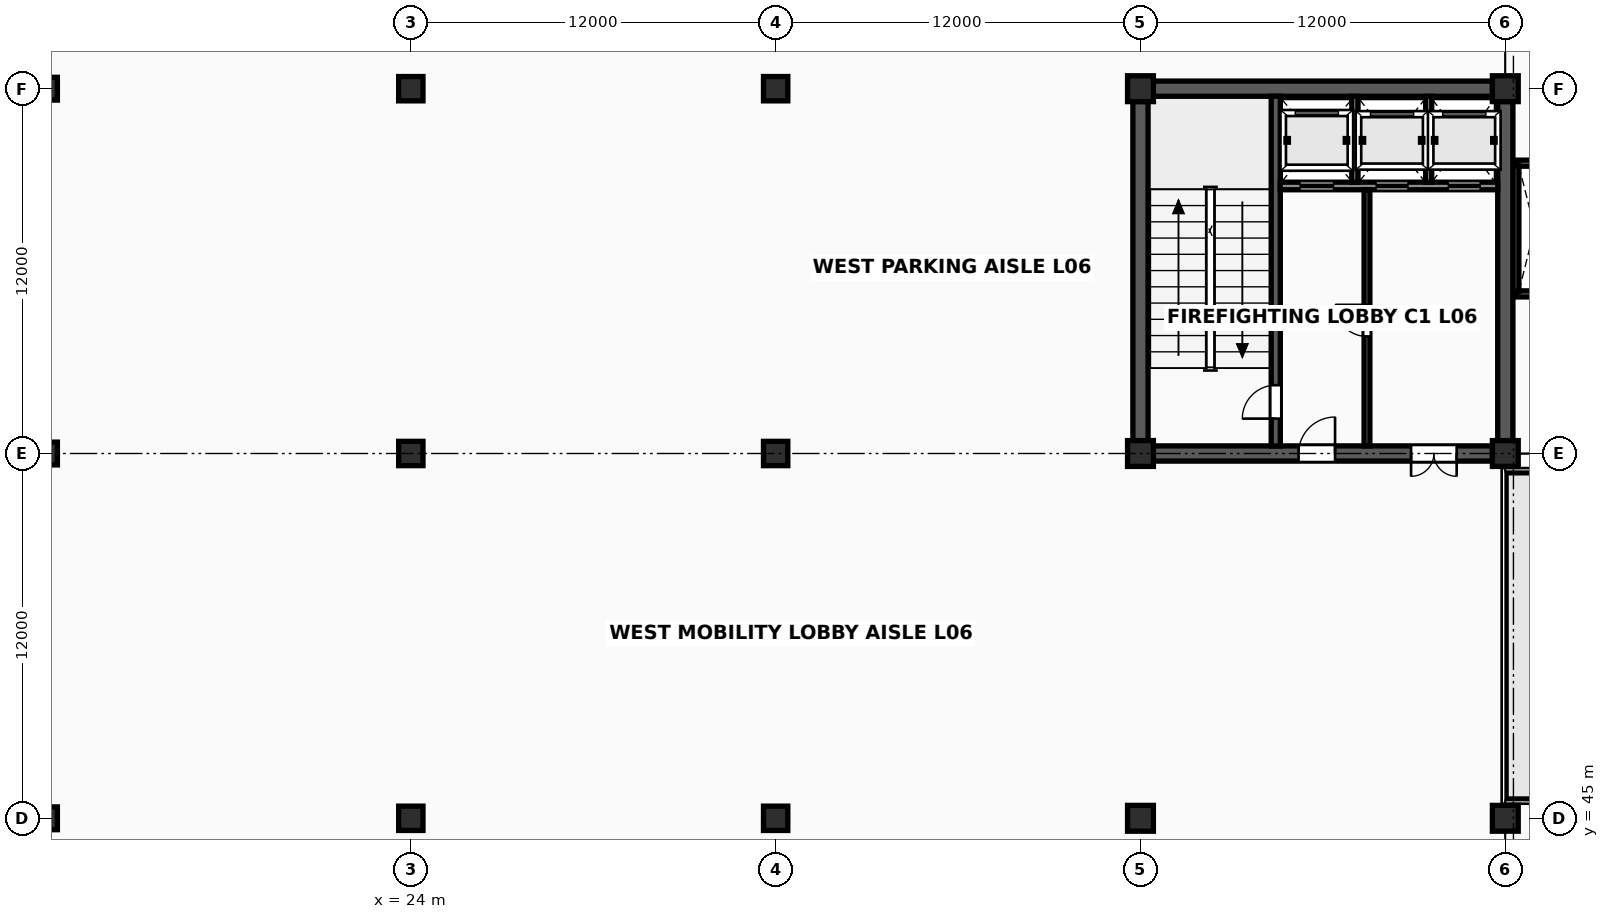
"""IFC4 building model, lengths in metres.
Left out: names, types, materials, properties, quantities, classifications, styles, units other than length and angle.
Written with IfcOpenShell. Run it as: python <this file> out.ifc"""

import sys

from ifc_helpers import new_model, si_unit, direction, frame, frame_2d, origin, origin_2d, place, context, subcontext, project, spatial, rectangle, extrude, element, fill, save


model = new_model("IFC4")
c1 = context("Model", 3, precision=1e-05, world=origin(), true_north=direction((0.0, 1.0)))
c2 = subcontext(c1, "Body", "Model", "MODEL_VIEW")
j1 = project(units=[si_unit("LENGTHUNIT", "METRE"), si_unit("PLANEANGLEUNIT", "RADIAN")], contexts=[c1])
p1 = place(None, origin())
s1 = spatial("IfcSite", under=j1, at=p1, CompositionType="ELEMENT")
p2 = place(p1, origin())
s2 = spatial("IfcBuilding", under=s1, at=p2, CompositionType="ELEMENT")
p3 = place(p2, frame((0.0, 0.0, 24.8)))
s3 = spatial("IfcBuildingStorey", under=s2, at=p3, CompositionType="ELEMENT", Elevation=24.8)
for number, where, z_axis, x_axis in (
    (1, (12.0, 45.0, 0.0), (0.0, 0.0, 1.0), (1.0, 0.0, 0.0)),
    (2, (12.0, 57.0, 0.0), (0.0, 0.0, 1.0), (1.0, 0.0, 0.0)),
    (3, (12.0, 69.0, 0.0), (0.0, 0.0, 1.0), (1.0, 0.0, 0.0)),
):
    element("IfcColumn", number, at=place(p3, frame(where, z_axis=z_axis, x_axis=x_axis)), inside=s3, PredefinedType="COLUMN", context=c2, shape_type="SweptSolid", body=[
        extrude(rectangle(XDim=0.75, YDim=0.75, at=origin_2d()), origin(), (0.0, 0.0, 1.0), 3.8),
    ])
for number, where, z_axis, x_axis in (
    (4, (24.0, 45.0, 0.0), (0.0, 0.0, 1.0), (1.0, 0.0, 0.0)),
    (5, (24.0, 57.0, 0.0), (0.0, 0.0, 1.0), (1.0, 0.0, 0.0)),
    (6, (24.0, 69.0, 0.0), (0.0, 0.0, 1.0), (1.0, 0.0, 0.0)),
    (7, (36.0, 45.0, 0.0), (0.0, 0.0, 1.0), (1.0, 0.0, 0.0)),
    (8, (36.0, 57.0, 0.0), (0.0, 0.0, 1.0), (1.0, 0.0, 0.0)),
    (9, (36.0, 69.0, 0.0), (0.0, 0.0, 1.0), (1.0, 0.0, 0.0)),
):
    element("IfcColumn", number, at=place(p3, frame(where, z_axis=z_axis, x_axis=x_axis)), inside=s3, PredefinedType="COLUMN", context=c2, shape_type="SweptSolid", body=[
        extrude(rectangle(XDim=0.8, YDim=0.8, at=origin_2d()), origin(), (0.0, 0.0, 1.0), 3.8),
    ])
for number, where, z_axis, x_axis in (
    (10, (48.0, 45.0, 0.0), (0.0, 0.0, 1.0), (1.0, 0.0, 0.0)),
    (11, (48.0, 57.0, 0.0), (0.0, 0.0, 1.0), (1.0, 0.0, 0.0)),
    (12, (48.0, 69.0, 0.0), (0.0, 0.0, 1.0), (1.0, 0.0, 0.0)),
    (13, (60.0, 45.0, 0.0), (0.0, 0.0, 1.0), (1.0, 0.0, 0.0)),
    (14, (60.0, 57.0, 0.0), (0.0, 0.0, 1.0), (1.0, 0.0, 0.0)),
    (15, (60.0, 69.0, 0.0), (0.0, 0.0, 1.0), (1.0, 0.0, 0.0)),
):
    element("IfcColumn", number, at=place(p3, frame(where, z_axis=z_axis, x_axis=x_axis)), inside=s3, PredefinedType="COLUMN", context=c2, shape_type="SweptSolid", body=[
        extrude(rectangle(XDim=0.85, YDim=0.85, at=origin_2d()), origin(), (0.0, 0.0, 1.0), 3.8),
    ])
for number, where, z_axis, x_axis in (
    (16, (60.347, 62.25, 0.0), (0.0, 0.0, 1.0), (1.0, 0.0, 0.0)),
    (17, (60.347, 66.55, 0.0), (0.0, 0.0, 1.0), (1.0, 0.0, 0.0)),
):
    element("IfcWall", number, at=place(p3, frame(where, z_axis=z_axis, x_axis=x_axis)), inside=s3, PredefinedType="SOLIDWALL", context=c2, shape_type="SweptSolid", body=[
        extrude(rectangle(XDim=1.233, YDim=0.2, at=frame_2d((0.617, 0.0))), origin(), (0.0, 0.0, 1.0), 3.628),
    ])
p4 = place(p3, frame((60.347, 62.33, 0.0), z_axis=(0.0, 0.0, 1.0), x_axis=(0.0, 1.0, 0.0)))
e18 = element("IfcWall", 18, at=p4, inside=s3, PredefinedType="SOLIDWALL", context=c2, shape_type="SweptSolid", body=[
    extrude(rectangle(XDim=4.14, YDim=0.2, at=frame_2d((2.07, 0.0))), origin(), (0.0, 0.0, 1.0), 3.628),
])
p5 = place(p3, frame((48.422, 57.0, 0.0), z_axis=(0.0, 0.0, 1.0), x_axis=(1.0, 0.0, 0.0)))
e19 = element("IfcWall", 19, at=p5, inside=s3, PredefinedType="SHEAR", context=c2, shape_type="SweptSolid", body=[
    extrude(rectangle(XDim=11.156, YDim=0.5, at=frame_2d((5.578, 0.0))), origin(), (0.0, 0.0, 1.0), 3.628),
])
p6 = place(p5, frame((4.778, 0.0, 0.0)))
e20 = element("IfcOpeningElement", 20, at=p6, cuts=e19, PredefinedType="OPENING", context=c2, shape_type="SweptSolid", body=[
    extrude(rectangle(XDim=1.2, YDim=2.2, at=frame_2d((0.6, 1.1))), frame((0.0, 0.265, 0.0), z_axis=(0.0, -1.0, 0.0), x_axis=(1.0, 0.0, 0.0)), (0.0, 0.0, 1.0), 0.53),
])
p7 = place(p5, frame((8.478, 0.0, 0.0)))
e21 = element("IfcOpeningElement", 21, at=p7, cuts=e19, PredefinedType="OPENING", context=c2, shape_type="SweptSolid", body=[
    extrude(rectangle(XDim=1.5, YDim=2.25, at=frame_2d((0.75, 1.125))), frame((0.0, 0.265, 0.0), z_axis=(0.0, -1.0, 0.0), x_axis=(1.0, 0.0, 0.0)), (0.0, 0.0, 1.0), 0.53),
])
for number, where, z_axis, x_axis in (
    (22, (48.422, 69.0, 0.0), (0.0, 0.0, 1.0), (1.0, 0.0, 0.0)),
    (23, (48.0, 57.422, 0.0), (0.0, 0.0, 1.0), (0.0, 1.0, 0.0)),
    (24, (60.0, 57.422, 0.0), (0.0, 0.0, 1.0), (0.0, 1.0, 0.0)),
):
    element("IfcWall", number, at=place(p3, frame(where, z_axis=z_axis, x_axis=x_axis)), inside=s3, PredefinedType="SHEAR", context=c2, shape_type="SweptSolid", body=[
        extrude(rectangle(XDim=11.156, YDim=0.5, at=frame_2d((5.578, 0.0))), origin(), (0.0, 0.0, 1.0), 3.628),
    ])
p8 = place(p3, frame((52.45, 57.247, 0.0), z_axis=(0.0, 0.0, 1.0), x_axis=(0.0, 1.0, 0.0)))
e25 = element("IfcWall", 25, at=p8, inside=s3, PredefinedType="SHEAR", context=c2, shape_type="SweptSolid", body=[
    extrude(rectangle(XDim=11.506, YDim=0.3, at=frame_2d((5.753, 0.0))), origin(), (0.0, 0.0, 1.0), 3.628),
])
p9 = place(p8, frame((0.9, 0.0, 0.0)))
e26 = element("IfcOpeningElement", 26, at=p9, cuts=e25, PredefinedType="OPENING", context=c2, shape_type="SweptSolid", body=[
    extrude(rectangle(XDim=1.1, YDim=2.2, at=frame_2d((0.55, 1.1))), frame((0.0, 0.165, 0.0), z_axis=(0.0, -1.0, 0.0), x_axis=(1.0, 0.0, 0.0)), (0.0, 0.0, 1.0), 0.33),
])
p10 = place(p3, frame((52.597, 65.8, 0.0), z_axis=(0.0, 0.0, 1.0), x_axis=(1.0, 0.0, 0.0)))
e27 = element("IfcWall", 27, at=p10, inside=s3, PredefinedType="SOLIDWALL", context=c2, shape_type="SweptSolid", body=[
    extrude(rectangle(XDim=7.156, YDim=0.25, at=frame_2d((3.578, 0.0))), origin(), (0.0, 0.0, 1.0), 3.628),
])
p11 = place(p10, frame((0.653, 0.0, 0.0)))
e28 = element("IfcOpeningElement", 28, at=p11, cuts=e27, PredefinedType="OPENING", context=c2, shape_type="SweptSolid", body=[
    extrude(rectangle(XDim=1.1, YDim=2.24, at=frame_2d((0.55, 1.12))), frame((0.0, 0.14, 0.0), z_axis=(0.0, -1.0, 0.0), x_axis=(1.0, 0.0, 0.0)), (0.0, 0.0, 1.0), 0.28),
])
p12 = place(p10, frame((3.153, 0.0, 0.0)))
e29 = element("IfcOpeningElement", 29, at=p12, cuts=e27, PredefinedType="OPENING", context=c2, shape_type="SweptSolid", body=[
    extrude(rectangle(XDim=1.05, YDim=2.2, at=frame_2d((0.525, 1.1))), frame((0.0, 0.14, 0.0), z_axis=(0.0, -1.0, 0.0), x_axis=(1.0, 0.0, 0.0)), (0.0, 0.0, 1.0), 0.28),
])
p13 = place(p10, frame((5.528, 0.0, 0.0)))
e30 = element("IfcOpeningElement", 30, at=p13, cuts=e27, PredefinedType="OPENING", context=c2, shape_type="SweptSolid", body=[
    extrude(rectangle(XDim=1.05, YDim=2.2, at=frame_2d((0.525, 1.1))), frame((0.0, 0.14, 0.0), z_axis=(0.0, -1.0, 0.0), x_axis=(1.0, 0.0, 0.0)), (0.0, 0.0, 1.0), 0.28),
])
for number, where, z_axis, x_axis in (
    (31, (55.05, 65.92, 0.0), (0.0, 0.0, 1.0), (0.0, 1.0, 0.0)),
    (32, (57.48, 65.92, 0.0), (0.0, 0.0, 1.0), (0.0, 1.0, 0.0)),
):
    element("IfcWall", number, at=place(p3, frame(where, z_axis=z_axis, x_axis=x_axis)), inside=s3, PredefinedType="SOLIDWALL", context=c2, shape_type="SweptSolid", body=[
        extrude(rectangle(XDim=2.83, YDim=0.2, at=frame_2d((1.415, 0.0))), origin(), (0.0, 0.0, 1.0), 3.618),
    ])
p14 = place(p3, frame((55.45, 57.25, 0.0), z_axis=(0.0, 0.0, 1.0), x_axis=(0.0, 1.0, 0.0)))
e33 = element("IfcWall", 33, at=p14, inside=s3, PredefinedType="SOLIDWALL", context=c2, shape_type="SweptSolid", body=[
    extrude(rectangle(XDim=8.43, YDim=0.19, at=frame_2d((4.215, 0.0))), origin(), (0.0, 0.0, 1.0), 3.618),
])
p15 = place(p14, frame((3.6, 0.0, 0.0)))
e34 = element("IfcOpeningElement", 34, at=p15, cuts=e33, PredefinedType="OPENING", context=c2, shape_type="SweptSolid", body=[
    extrude(rectangle(XDim=1.04, YDim=2.18, at=frame_2d((0.52, 1.09))), frame((0.0, 0.11, 0.0), z_axis=(0.0, -1.0, 0.0), x_axis=(1.0, 0.0, 0.0)), (0.0, 0.0, 1.0), 0.22),
])
p16 = place(p9, origin())
e35 = element("IfcDoor", 35, at=p16, inside=s3, OperationType="SINGLE_SWING_LEFT", PredefinedType="DOOR", context=c2, shape_type="SweptSolid", body=[
    extrude(rectangle(XDim=1.1, YDim=2.2, at=frame_2d((0.55, 1.1))), frame((0.0, 0.025, 0.0), z_axis=(0.0, -1.0, 0.0), x_axis=(1.0, 0.0, 0.0)), (0.0, 0.0, 1.0), 0.05),
])
fill(e26, e35)
p17 = place(p15, origin())
e36 = element("IfcDoor", 36, at=p17, inside=s3, OperationType="SINGLE_SWING_RIGHT", PredefinedType="DOOR", context=c2, shape_type="SweptSolid", body=[
    extrude(rectangle(XDim=1.04, YDim=2.18, at=frame_2d((0.52, 1.09))), frame((0.0, 0.025, 0.0), z_axis=(0.0, -1.0, 0.0), x_axis=(1.0, 0.0, 0.0)), (0.0, 0.0, 1.0), 0.05),
])
fill(e34, e36)
p18 = place(p6, origin())
e37 = element("IfcDoor", 37, at=p18, inside=s3, OperationType="SINGLE_SWING_RIGHT", PredefinedType="DOOR", context=c2, shape_type="SweptSolid", body=[
    extrude(rectangle(XDim=1.2, YDim=2.2, at=frame_2d((0.6, 1.1))), frame((0.0, 0.025, 0.0), z_axis=(0.0, -1.0, 0.0), x_axis=(1.0, 0.0, 0.0)), (0.0, 0.0, 1.0), 0.05),
])
fill(e20, e37)
p19 = place(p7, origin())
e38 = element("IfcDoor", 38, at=p19, inside=s3, OperationType="DOUBLE_DOOR_SINGLE_SWING", PredefinedType="DOOR", context=c2, shape_type="SweptSolid", body=[
    extrude(rectangle(XDim=1.5, YDim=2.25, at=frame_2d((0.75, 1.125))), frame((0.0, 0.025, 0.0), z_axis=(0.0, -1.0, 0.0), x_axis=(1.0, 0.0, 0.0)), (0.0, 0.0, 1.0), 0.05),
])
fill(e21, e38)
p20 = place(p11, origin())
e39 = element("IfcDoor", 39, at=p20, inside=s3, OperationType="SLIDING_TO_LEFT", PredefinedType="USERDEFINED", context=c2, shape_type="SweptSolid", body=[
    extrude(rectangle(XDim=1.1, YDim=2.24, at=frame_2d((0.55, 1.12))), frame((0.0, 0.025, 0.0), z_axis=(0.0, -1.0, 0.0), x_axis=(1.0, 0.0, 0.0)), (0.0, 0.0, 1.0), 0.05),
])
fill(e28, e39)
p21 = place(p12, origin())
e40 = element("IfcDoor", 40, at=p21, inside=s3, OperationType="SLIDING_TO_LEFT", PredefinedType="USERDEFINED", context=c2, shape_type="SweptSolid", body=[
    extrude(rectangle(XDim=1.05, YDim=2.2, at=frame_2d((0.525, 1.1))), frame((0.0, 0.025, 0.0), z_axis=(0.0, -1.0, 0.0), x_axis=(1.0, 0.0, 0.0)), (0.0, 0.0, 1.0), 0.05),
])
fill(e29, e40)
p22 = place(p13, origin())
e41 = element("IfcDoor", 41, at=p22, inside=s3, OperationType="SLIDING_TO_LEFT", PredefinedType="USERDEFINED", context=c2, shape_type="SweptSolid", body=[
    extrude(rectangle(XDim=1.05, YDim=2.2, at=frame_2d((0.525, 1.1))), frame((0.0, 0.025, 0.0), z_axis=(0.0, -1.0, 0.0), x_axis=(1.0, 0.0, 0.0)), (0.0, 0.0, 1.0), 0.05),
])
fill(e30, e41)
save(model, sys.argv[1])
